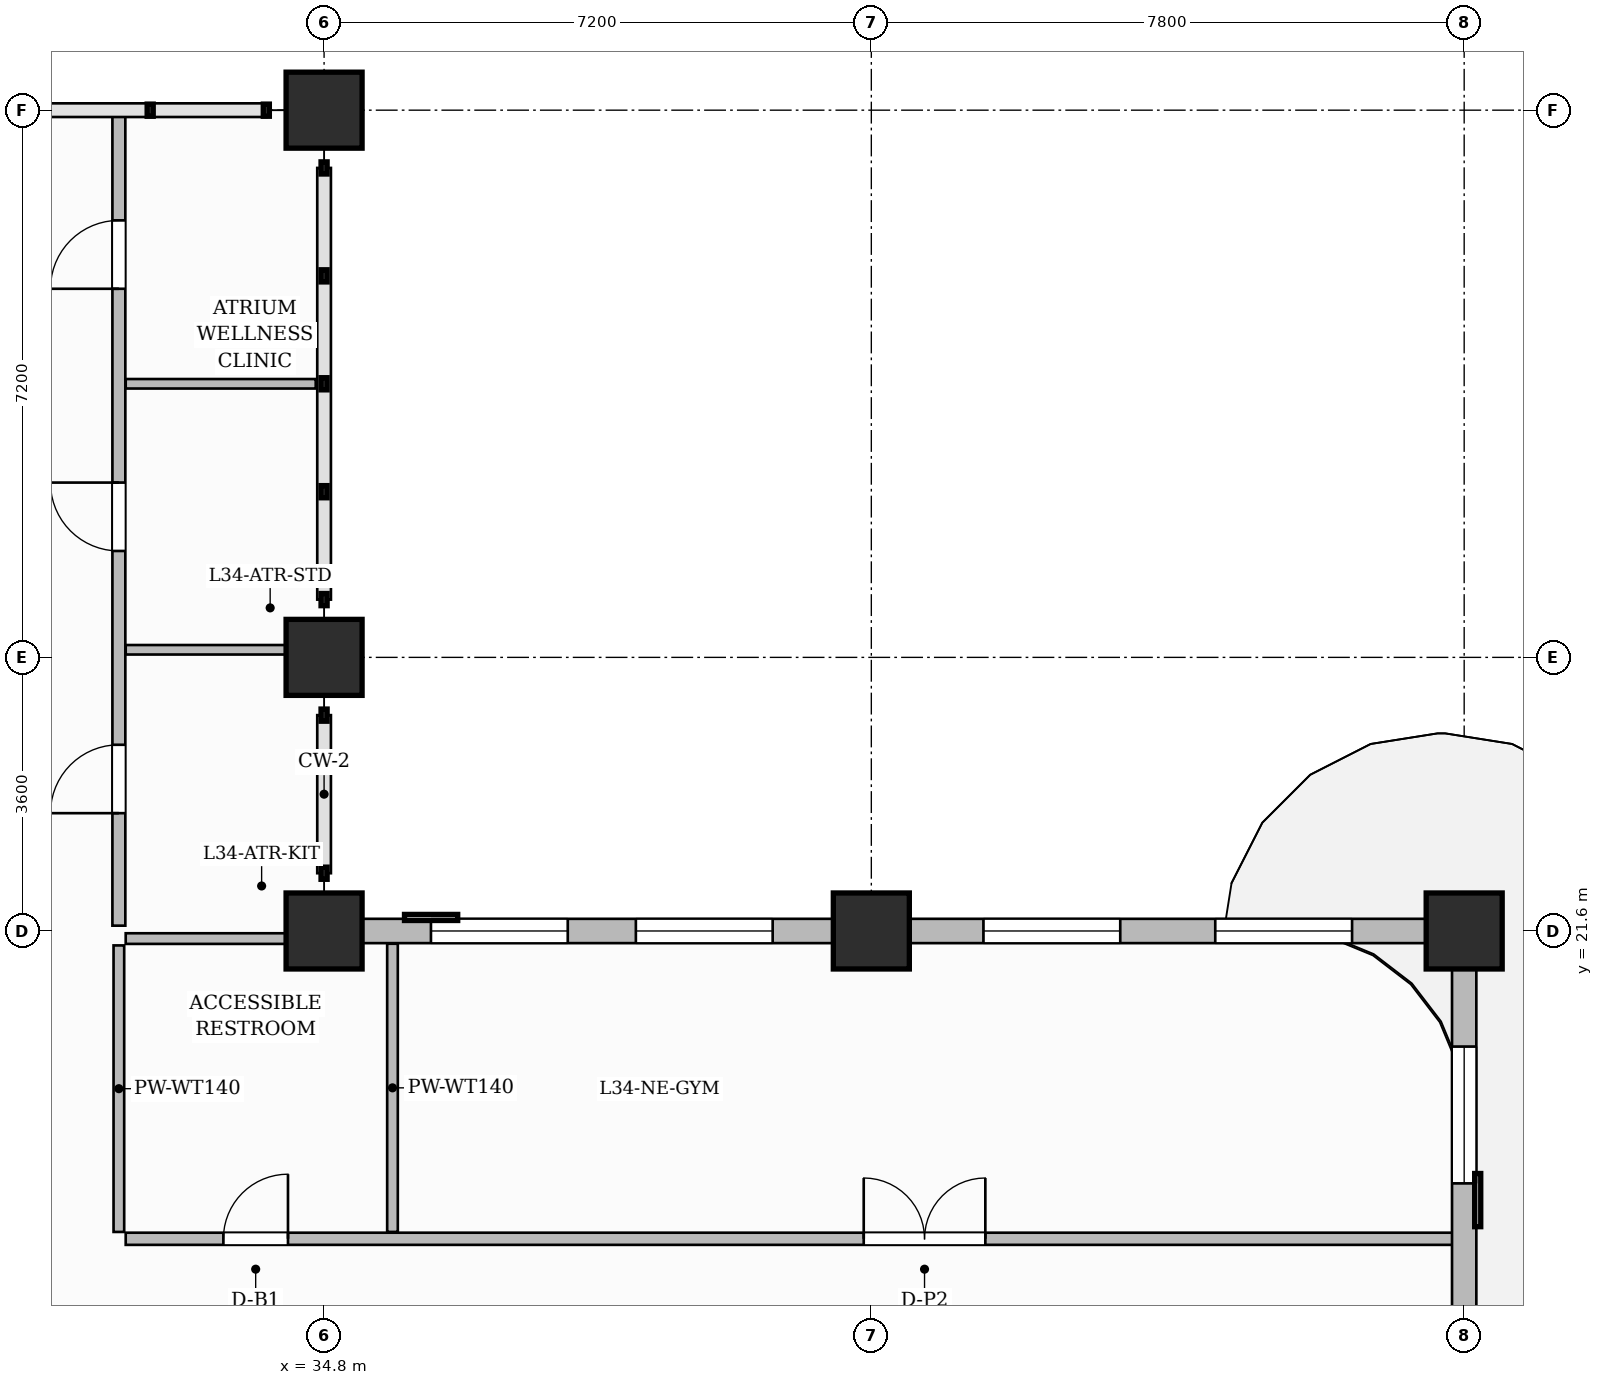
"""IFC4 building model, lengths in metres.
Left out: names, types, materials, properties, quantities, classifications, styles, units other than length and angle.
Written with IfcOpenShell. Run it as: python <this file> out.ifc"""

import sys

from ifc_helpers import new_model, si_unit, direction, frame, frame_2d, origin, origin_2d, place, context, subcontext, project, spatial, rectangle, extrude, source, transform, mapped, element, fill, save


model = new_model("IFC4")
c1 = context("Model", 3, precision=1e-05, world=origin(), true_north=direction((0.0, 1.0)))
c2 = subcontext(c1, "Body", "Model", "MODEL_VIEW")
j1 = project(units=[si_unit("LENGTHUNIT", "METRE"), si_unit("PLANEANGLEUNIT", "RADIAN")], contexts=[c1])
p1 = place(None, origin())
s1 = spatial("IfcSite", under=j1, at=p1, CompositionType="ELEMENT")
p2 = place(p1, origin())
s2 = spatial("IfcBuilding", under=s1, at=p2, CompositionType="ELEMENT")
p3 = place(p2, frame((0.0, 0.0, 137.7)))
s3 = spatial("IfcBuildingStorey", under=s2, at=p3, CompositionType="ELEMENT", Elevation=137.7)
m1 = source(origin(), c2, "Body", "SweptSolid", [
    extrude(rectangle(XDim=1.0, YDim=1.0, at=origin_2d()), origin(), (0.0, 0.0, 1.0), 3.7),
])
for number, where, z_axis, x_axis in (
    (1, (34.8, 21.6, 0.0), (0.0, 0.0, 1.0), (1.0, 0.0, 0.0)),
    (2, (34.8, 25.2, 0.0), (0.0, 0.0, 1.0), (1.0, 0.0, 0.0)),
    (3, (34.8, 32.4, 0.0), (0.0, 0.0, 1.0), (1.0, 0.0, 0.0)),
    (4, (42.0, 21.6, 0.0), (0.0, 0.0, 1.0), (1.0, 0.0, 0.0)),
    (5, (49.8, 21.6, 0.0), (0.0, 0.0, 1.0), (1.0, 0.0, 0.0)),
):
    element("IfcColumn", number, at=place(p3, frame(where, z_axis=z_axis, x_axis=x_axis)), inside=s3, PredefinedType="COLUMN", context=c2, shape_type="MappedRepresentation", body=[
        mapped(m1, transform((0.0, 0.0, 0.0), scale=1.0)),
    ])
p4 = place(p3, frame((32.19, 17.55, 0.0), z_axis=(0.0, 0.0, 1.0), x_axis=(1.0, 0.0, 0.0)))
e6 = element("IfcWall", 6, at=p4, inside=s3, PredefinedType="PARTITIONING", context=c2, shape_type="SweptSolid", body=[
    extrude(rectangle(XDim=17.47, YDim=0.16, at=frame_2d((8.735, 0.0))), origin(), (0.0, 0.0, 1.0), 3.45),
])
p5 = place(p4, frame((1.285, 0.0, 0.0)))
e7 = element("IfcOpeningElement", 7, at=p5, cuts=e6, PredefinedType="OPENING", context=c2, shape_type="SweptSolid", body=[
    extrude(rectangle(XDim=0.85, YDim=2.1, at=frame_2d((0.425, 1.05))), frame((0.0, 0.09, 0.0), z_axis=(0.0, -1.0, 0.0), x_axis=(1.0, 0.0, 0.0)), (0.0, 0.0, 1.0), 0.18),
])
p6 = place(p4, frame((9.71, 0.0, 0.0)))
e8 = element("IfcOpeningElement", 8, at=p6, cuts=e6, PredefinedType="OPENING", context=c2, shape_type="SweptSolid", body=[
    extrude(rectangle(XDim=1.6, YDim=2.4, at=frame_2d((0.8, 1.2))), frame((0.0, 0.09, 0.0), z_axis=(0.0, -1.0, 0.0), x_axis=(1.0, 0.0, 0.0)), (0.0, 0.0, 1.0), 0.18),
])
p7 = place(p3, frame((32.1, 17.64, 0.0), z_axis=(0.0, 0.0, 1.0), x_axis=(0.0, 1.0, 0.0)))
e9 = element("IfcWall", 9, at=p7, inside=s3, PredefinedType="PARTITIONING", context=c2, shape_type="SweptSolid", body=[
    extrude(rectangle(XDim=3.77, YDim=0.14, at=frame_2d((1.885, 0.0))), origin(), (0.0, 0.0, 1.0), 3.45),
])
p8 = place(p3, frame((35.7, 17.64, 0.0), z_axis=(0.0, 0.0, 1.0), x_axis=(0.0, 1.0, 0.0)))
e10 = element("IfcWall", 10, at=p8, inside=s3, PredefinedType="PARTITIONING", context=c2, shape_type="SweptSolid", body=[
    extrude(rectangle(XDim=3.792, YDim=0.14, at=frame_2d((1.896, 0.0))), origin(), (0.0, 0.0, 1.0), 3.45),
])
p9 = place(p3, frame((32.19, 21.5, 0.0), z_axis=(0.0, 0.0, 1.0), x_axis=(1.0, 0.0, 0.0)))
e11 = element("IfcWall", 11, at=p9, inside=s3, PredefinedType="PARTITIONING", context=c2, shape_type="SweptSolid", body=[
    extrude(rectangle(XDim=2.42, YDim=0.14, at=frame_2d((1.21, 0.0))), origin(), (0.0, 0.0, 1.0), 2.935),
])
p10 = place(p3, frame((32.1, 21.67, 0.0), z_axis=(0.0, 0.0, 1.0), x_axis=(0.0, 1.0, 0.0)))
e12 = element("IfcWall", 12, at=p10, inside=s3, PredefinedType="PARTITIONING", context=c2, shape_type="SweptSolid", body=[
    extrude(rectangle(XDim=10.702, YDim=0.17, at=frame_2d((5.351, 0.0))), origin(), (0.0, 0.0, 1.0), 3.45),
])
p11 = place(p10, frame((1.48, 0.0, 0.0)))
e13 = element("IfcOpeningElement", 13, at=p11, cuts=e12, PredefinedType="OPENING", context=c2, shape_type="SweptSolid", body=[
    extrude(rectangle(XDim=0.9, YDim=2.15, at=frame_2d((0.45, 1.075))), frame((0.0, 0.095, 0.0), z_axis=(0.0, -1.0, 0.0), x_axis=(1.0, 0.0, 0.0)), (0.0, 0.0, 1.0), 0.19),
])
p12 = place(p10, frame((4.93, 0.0, 0.0)))
e14 = element("IfcOpeningElement", 14, at=p12, cuts=e12, PredefinedType="OPENING", context=c2, shape_type="SweptSolid", body=[
    extrude(rectangle(XDim=0.9, YDim=2.15, at=frame_2d((0.45, 1.075))), frame((0.0, 0.095, 0.0), z_axis=(0.0, -1.0, 0.0), x_axis=(1.0, 0.0, 0.0)), (0.0, 0.0, 1.0), 0.19),
])
p13 = place(p10, frame((8.38, 0.0, 0.0)))
e15 = element("IfcOpeningElement", 15, at=p13, cuts=e12, PredefinedType="OPENING", context=c2, shape_type="SweptSolid", body=[
    extrude(rectangle(XDim=0.9, YDim=2.15, at=frame_2d((0.45, 1.075))), frame((0.0, 0.095, 0.0), z_axis=(0.0, -1.0, 0.0), x_axis=(1.0, 0.0, 0.0)), (0.0, 0.0, 1.0), 0.19),
])
for number, where, z_axis, x_axis in (
    (16, (32.19, 25.3, 0.0), (0.0, 0.0, 1.0), (1.0, 0.0, 0.0)),
    (17, (32.19, 28.8, 0.0), (0.0, 0.0, 1.0), (1.0, 0.0, 0.0)),
):
    element("IfcWall", number, at=place(p3, frame(where, z_axis=z_axis, x_axis=x_axis)), inside=s3, PredefinedType="PARTITIONING", context=c2, shape_type="SweptSolid", body=[
        extrude(rectangle(XDim=2.5, YDim=0.125, at=frame_2d((1.25, 0.0))), origin(), (0.0, 0.0, 1.0), 3.45),
    ])
p14 = place(p3, frame((49.8, 14.62, 0.0), z_axis=(0.0, 0.0, 1.0), x_axis=(0.0, 1.0, 0.0)))
e18 = element("IfcWall", 18, at=p14, inside=s3, PredefinedType="SOLIDWALL", context=c2, shape_type="SweptSolid", body=[
    extrude(rectangle(XDim=6.93, YDim=0.32, at=frame_2d((3.465, 0.0))), origin(), (0.0, 0.0, 1.0), 2.935),
])
p15 = place(p14, frame((0.42, 0.0, 0.0)))
e19 = element("IfcOpeningElement", 19, at=p15, cuts=e18, PredefinedType="OPENING", context=c2, shape_type="SweptSolid", body=[
    extrude(rectangle(XDim=1.2, YDim=2.2, at=frame_2d((0.6, 1.1))), frame((0.0, 0.17, 0.0), z_axis=(0.0, -1.0, 0.0), x_axis=(1.0, 0.0, 0.0)), (0.0, 0.0, 1.0), 0.34),
])
p16 = place(p14, frame((3.659, 0.0, 0.8)))
e20 = element("IfcOpeningElement", 20, at=p16, cuts=e18, PredefinedType="OPENING", context=c2, shape_type="SweptSolid", body=[
    extrude(rectangle(XDim=1.8, YDim=1.85, at=frame_2d((0.9, 0.925))), frame((0.0, 0.17, 0.0), z_axis=(0.0, -1.0, 0.0), x_axis=(1.0, 0.0, 0.0)), (0.0, 0.0, 1.0), 0.34),
])
p17 = place(p3, frame((34.8, 21.6, 0.0), z_axis=(0.0, 0.0, 1.0), x_axis=(1.0, 0.0, 0.0)))
e21 = element("IfcWall", 21, at=p17, inside=s3, PredefinedType="SOLIDWALL", context=c2, shape_type="SweptSolid", body=[
    extrude(rectangle(XDim=15.0, YDim=0.32, at=frame_2d((7.5, 0.0))), origin(), (0.0, 0.0, 1.0), 2.935),
])
p18 = place(p17, frame((1.406, 0.0, 0.8)))
e22 = element("IfcOpeningElement", 22, at=p18, cuts=e21, PredefinedType="OPENING", context=c2, shape_type="SweptSolid", body=[
    extrude(rectangle(XDim=1.8, YDim=1.85, at=frame_2d((0.9, 0.925))), frame((0.0, 0.17, 0.0), z_axis=(0.0, -1.0, 0.0), x_axis=(1.0, 0.0, 0.0)), (0.0, 0.0, 1.0), 0.34),
])
p19 = place(p17, frame((4.102, 0.0, 0.8)))
e23 = element("IfcOpeningElement", 23, at=p19, cuts=e21, PredefinedType="OPENING", context=c2, shape_type="SweptSolid", body=[
    extrude(rectangle(XDim=1.8, YDim=1.85, at=frame_2d((0.9, 0.925))), frame((0.0, 0.17, 0.0), z_axis=(0.0, -1.0, 0.0), x_axis=(1.0, 0.0, 0.0)), (0.0, 0.0, 1.0), 0.34),
])
p20 = place(p17, frame((8.675, 0.0, 0.8)))
e24 = element("IfcOpeningElement", 24, at=p20, cuts=e21, PredefinedType="OPENING", context=c2, shape_type="SweptSolid", body=[
    extrude(rectangle(XDim=1.8, YDim=1.85, at=frame_2d((0.9, 0.925))), frame((0.0, 0.17, 0.0), z_axis=(0.0, -1.0, 0.0), x_axis=(1.0, 0.0, 0.0)), (0.0, 0.0, 1.0), 0.34),
])
p21 = place(p17, frame((11.725, 0.0, 0.8)))
e25 = element("IfcOpeningElement", 25, at=p21, cuts=e21, PredefinedType="OPENING", context=c2, shape_type="SweptSolid", body=[
    extrude(rectangle(XDim=1.8, YDim=1.85, at=frame_2d((0.9, 0.925))), frame((0.0, 0.17, 0.0), z_axis=(0.0, -1.0, 0.0), x_axis=(1.0, 0.0, 0.0)), (0.0, 0.0, 1.0), 0.34),
])
m2 = source(origin(), c2, "Body", "SweptSolid", [
    extrude(rectangle(XDim=0.85, YDim=2.1, at=frame_2d((0.425, 1.05))), frame((0.0, 0.025, 0.0), z_axis=(0.0, -1.0, 0.0), x_axis=(1.0, 0.0, 0.0)), (0.0, 0.0, 1.0), 0.05),
])
p22 = place(p5, origin())
e26 = element("IfcDoor", 26, at=p22, inside=s3, OperationType="SINGLE_SWING_RIGHT", PredefinedType="DOOR", context=c2, shape_type="MappedRepresentation", body=[
    mapped(m2, transform((0.0, 0.0, 0.0), scale=1.0)),
])
fill(e7, e26)
m3 = source(origin(), c2, "Body", "SweptSolid", [
    extrude(rectangle(XDim=1.6, YDim=2.4, at=frame_2d((0.8, 1.2))), frame((0.0, 0.025, 0.0), z_axis=(0.0, -1.0, 0.0), x_axis=(1.0, 0.0, 0.0)), (0.0, 0.0, 1.0), 0.05),
])
p23 = place(p6, origin())
e27 = element("IfcDoor", 27, at=p23, inside=s3, OperationType="DOUBLE_DOOR_SINGLE_SWING", PredefinedType="DOOR", context=c2, shape_type="MappedRepresentation", body=[
    mapped(m3, transform((0.0, 0.0, 0.0), scale=1.0)),
])
fill(e8, e27)
m4 = source(origin(), c2, "Body", "SweptSolid", [
    extrude(rectangle(XDim=0.9, YDim=2.15, at=frame_2d((0.45, 1.075))), frame((0.0, 0.025, 0.0), z_axis=(0.0, -1.0, 0.0), x_axis=(1.0, 0.0, 0.0)), (0.0, 0.0, 1.0), 0.05),
])
p24 = place(p11, origin())
e28 = element("IfcDoor", 28, at=p24, inside=s3, OperationType="SINGLE_SWING_LEFT", PredefinedType="DOOR", context=c2, shape_type="MappedRepresentation", body=[
    mapped(m4, transform((0.0, 0.0, 0.0), scale=1.0)),
])
fill(e13, e28)
p25 = place(p12, origin())
e29 = element("IfcDoor", 29, at=p25, inside=s3, OperationType="SINGLE_SWING_RIGHT", PredefinedType="DOOR", context=c2, shape_type="MappedRepresentation", body=[
    mapped(m4, transform((0.0, 0.0, 0.0), scale=1.0)),
])
fill(e14, e29)
p26 = place(p13, origin())
e30 = element("IfcDoor", 30, at=p26, inside=s3, OperationType="SINGLE_SWING_LEFT", PredefinedType="DOOR", context=c2, shape_type="MappedRepresentation", body=[
    mapped(m4, transform((0.0, 0.0, 0.0), scale=1.0)),
])
fill(e15, e30)
m5 = source(origin(), c2, "Body", "SweptSolid", [
    extrude(rectangle(XDim=1.8, YDim=1.85, at=frame_2d((0.9, 0.925))), frame((0.0, 0.03, 0.0), z_axis=(0.0, -1.0, 0.0), x_axis=(1.0, 0.0, 0.0)), (0.0, 0.0, 1.0), 0.06),
])
p27 = place(p16, origin())
e31 = element("IfcWindow", 31, at=p27, inside=s3, PartitioningType="DOUBLE_PANEL_VERTICAL", PredefinedType="WINDOW", context=c2, shape_type="MappedRepresentation", body=[
    mapped(m5, transform((0.0, 0.0, 0.0), scale=1.0)),
])
fill(e20, e31)
p28 = place(p18, origin())
e32 = element("IfcWindow", 32, at=p28, inside=s3, PartitioningType="DOUBLE_PANEL_VERTICAL", PredefinedType="WINDOW", context=c2, shape_type="MappedRepresentation", body=[
    mapped(m5, transform((0.0, 0.0, 0.0), scale=1.0)),
])
fill(e22, e32)
p29 = place(p19, origin())
e33 = element("IfcWindow", 33, at=p29, inside=s3, PartitioningType="DOUBLE_PANEL_VERTICAL", PredefinedType="WINDOW", context=c2, shape_type="MappedRepresentation", body=[
    mapped(m5, transform((0.0, 0.0, 0.0), scale=1.0)),
])
fill(e23, e33)
p30 = place(p20, origin())
e34 = element("IfcWindow", 34, at=p30, inside=s3, PartitioningType="DOUBLE_PANEL_VERTICAL", PredefinedType="WINDOW", context=c2, shape_type="MappedRepresentation", body=[
    mapped(m5, transform((0.0, 0.0, 0.0), scale=1.0)),
])
fill(e24, e34)
p31 = place(p21, origin())
e35 = element("IfcWindow", 35, at=p31, inside=s3, PartitioningType="DOUBLE_PANEL_VERTICAL", PredefinedType="WINDOW", context=c2, shape_type="MappedRepresentation", body=[
    mapped(m5, transform((0.0, 0.0, 0.0), scale=1.0)),
])
fill(e25, e35)
save(model, sys.argv[1])
